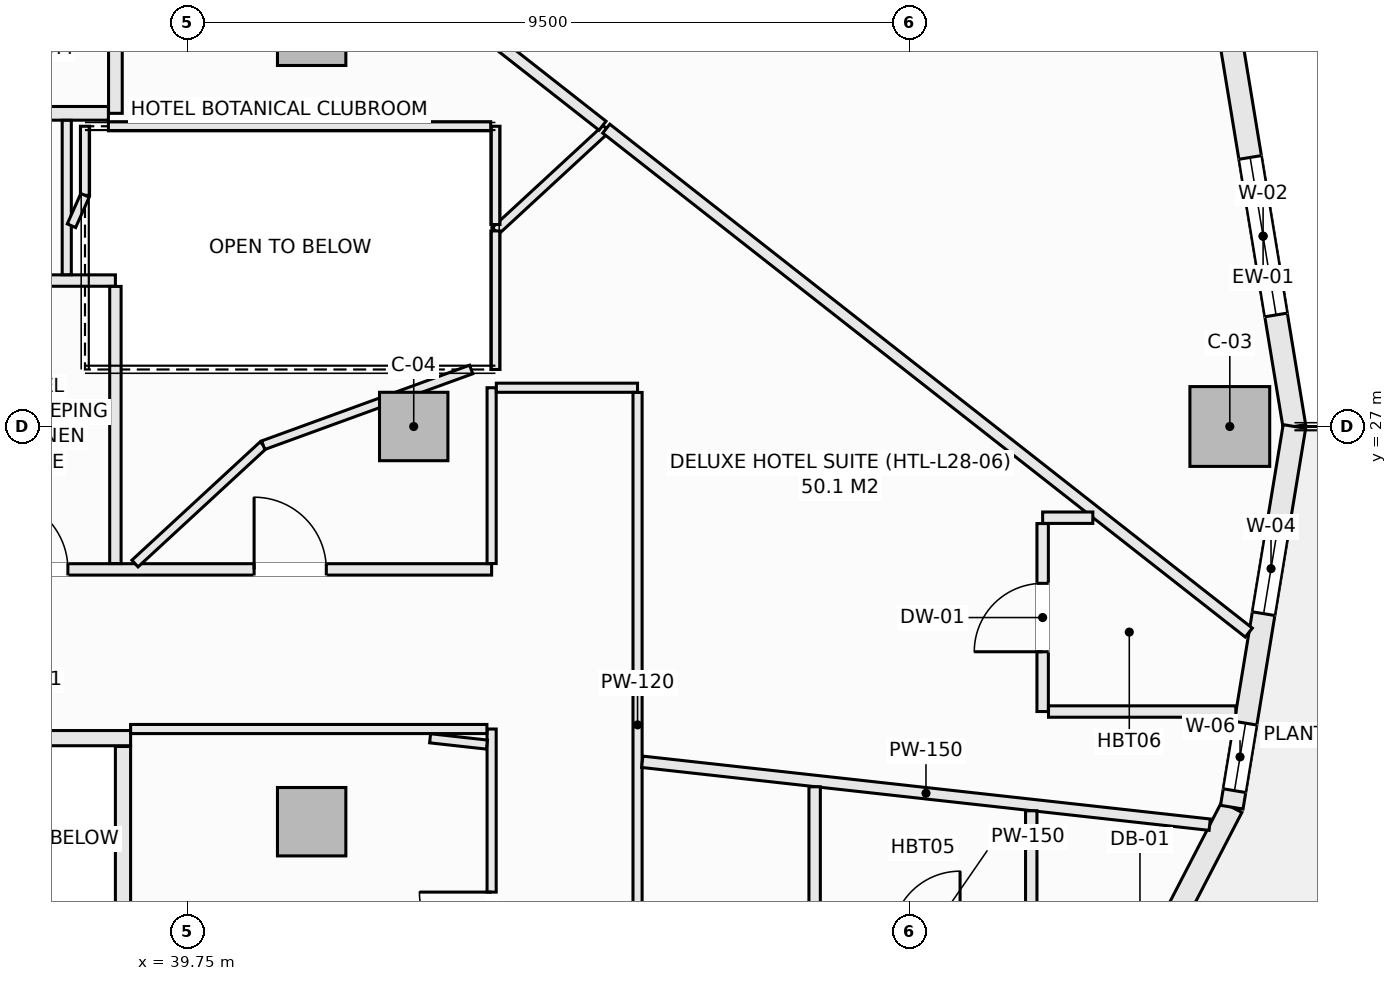
"""IFC4 building model, lengths in metres.
Left out: names, types, materials, properties, quantities, classifications, styles, units other than length and angle.
Written with IfcOpenShell. Run it as: python <this file> out.ifc"""

import sys

from ifc_helpers import new_model, si_unit, direction, frame, frame_2d, origin, origin_2d, place, context, subcontext, project, spatial, rectangle, extrude, element, fill, save


model = new_model("IFC4")
c1 = context("Model", 3, precision=1e-05, world=origin(), true_north=direction((0.0, 1.0)))
c2 = subcontext(c1, "Body", "Model", "MODEL_VIEW")
j1 = project(units=[si_unit("LENGTHUNIT", "METRE"), si_unit("PLANEANGLEUNIT", "RADIAN")], contexts=[c1])
p1 = place(None, origin())
s1 = spatial("IfcSite", under=j1, at=p1, CompositionType="ELEMENT")
p2 = place(p1, origin())
s2 = spatial("IfcBuilding", under=s1, at=p2, CompositionType="ELEMENT")
p3 = place(p2, frame((0.0, 0.0, 115.5)))
s3 = spatial("IfcBuildingStorey", under=s2, at=p3, CompositionType="ELEMENT", Elevation=115.5)
p4 = place(p3, frame((53.462, 27.0, -0.27), z_axis=(0.0, 0.0, 1.0), x_axis=(1.0, 0.0, 0.0)))
e1 = element("IfcColumn", 1, at=p4, inside=s3, PredefinedType="COLUMN", context=c2, shape_type="SweptSolid", body=[
    extrude(rectangle(XDim=1.05, YDim=1.05, at=origin_2d()), origin(), (0.0, 0.0, 1.0), 3.4),
])
for number, where, z_axis, x_axis in (
    (2, (42.725, 27.0, -0.27), (0.0, 0.0, 1.0), (1.0, 0.0, 0.0)),
    (3, (41.382, 32.199, -0.27), (0.0, 0.0, 1.0), (1.0, 0.0, 0.0)),
    (4, (41.382, 21.801, -0.27), (0.0, 0.0, 1.0), (1.0, 0.0, 0.0)),
):
    element("IfcColumn", number, at=place(p3, frame(where, z_axis=z_axis, x_axis=x_axis)), inside=s3, PredefinedType="COLUMN", context=c2, shape_type="SweptSolid", body=[
        extrude(rectangle(XDim=0.9, YDim=0.9, at=origin_2d()), origin(), (0.0, 0.0, 1.0), 3.4),
    ])
p5 = place(p3, frame((53.488, 32.008, 0.0), z_axis=(0.0, 0.0, 1.0), x_axis=(0.162393944769, -0.986726003864, 0.0)))
e5 = element("IfcWall", 5, at=p5, inside=s3, PredefinedType="SOLIDWALL", context=c2, shape_type="SweptSolid", body=[
    extrude(rectangle(XDim=5.075, YDim=0.3, at=frame_2d((2.538, 0.0))), origin(), (0.0, 0.0, 1.0), 2.653),
])
p6 = place(p5, frame((1.488, 0.0, 0.74)))
e6 = element("IfcOpeningElement", 6, at=p6, cuts=e5, PredefinedType="OPENING", context=c2, shape_type="SweptSolid", body=[
    extrude(rectangle(XDim=2.1, YDim=1.7, at=frame_2d((1.05, 0.85))), frame((0.0, 0.16, 0.0), z_axis=(0.0, -1.0, 0.0), x_axis=(1.0, 0.0, 0.0)), (0.0, 0.0, 1.0), 0.32),
])
p7 = place(p3, frame((51.072, 17.325, 0.0), z_axis=(0.0, 0.0, 1.0), x_axis=(0.459767899643, 0.888039119892, 0.0)))
e7 = element("IfcWall", 7, at=p7, inside=s3, PredefinedType="SOLIDWALL", context=c2, shape_type="SweptSolid", body=[
    extrude(rectangle(XDim=5.255, YDim=0.3, at=frame_2d((2.628, 0.0))), origin(), (0.0, 0.0, 1.0), 2.653),
])
p8 = place(p7, frame((1.728, 0.0, 0.0)))
e8 = element("IfcOpeningElement", 8, at=p8, cuts=e7, PredefinedType="OPENING", context=c2, shape_type="SweptSolid", body=[
    extrude(rectangle(XDim=1.8, YDim=2.25, at=frame_2d((0.9, 1.125))), frame((0.0, 0.16, 0.0), z_axis=(0.0, -1.0, 0.0), x_axis=(1.0, 0.0, 0.0)), (0.0, 0.0, 1.0), 0.32),
])
p9 = place(p3, frame((53.488, 21.992, 0.0), z_axis=(0.0, 0.0, 1.0), x_axis=(0.162393944769, 0.986726003864, 0.0)))
e9 = element("IfcWall", 9, at=p9, inside=s3, PredefinedType="SOLIDWALL", context=c2, shape_type="SweptSolid", body=[
    extrude(rectangle(XDim=5.075, YDim=0.3, at=frame_2d((2.538, 0.0))), origin(), (0.0, 0.0, 1.0), 2.653),
])
p10 = place(p9, frame((2.58, 0.0, 0.72)))
e10 = element("IfcOpeningElement", 10, at=p10, cuts=e9, PredefinedType="OPENING", context=c2, shape_type="SweptSolid", body=[
    extrude(rectangle(XDim=1.2, YDim=1.65, at=frame_2d((0.6, 0.825))), frame((0.0, 0.16, 0.0), z_axis=(0.0, -1.0, 0.0), x_axis=(1.0, 0.0, 0.0)), (0.0, 0.0, 1.0), 0.32),
])
p11 = place(p9, frame((0.22, 0.0, 0.72)))
e11 = element("IfcOpeningElement", 11, at=p11, cuts=e9, PredefinedType="OPENING", context=c2, shape_type="SweptSolid", body=[
    extrude(rectangle(XDim=0.9, YDim=1.65, at=frame_2d((0.45, 0.825))), frame((0.0, 0.16, 0.0), z_axis=(0.0, -1.0, 0.0), x_axis=(1.0, 0.0, 0.0)), (0.0, 0.0, 1.0), 0.32),
])
p12 = place(p3, frame((54.129, 15.878, 0.0), z_axis=(0.0, 0.0, 1.0), x_axis=(0.441269631716, 0.897374566235, 0.0)))
e12 = element("IfcWall", 12, at=p12, inside=s3, PredefinedType="PARAPET", context=c2, shape_type="SweptSolid", body=[
    extrude(rectangle(XDim=6.056, YDim=0.22, at=frame_2d((3.028, 0.0))), origin(), (0.0, 0.0, 1.0), 0.52),
])
p13 = place(p3, frame((36.75, 22.9, 0.0), z_axis=(0.0, 0.0, 1.0), x_axis=(1.0, 0.0, 0.0)))
e13 = element("IfcWall", 13, at=p13, inside=s3, PredefinedType="SOLIDWALL", context=c2, shape_type="SweptSolid", body=[
    extrude(rectangle(XDim=2.25, YDim=0.2, at=frame_2d((1.125, 0.0))), origin(), (0.0, 0.0, 1.0), 3.13),
])
p14 = place(p3, frame((38.9, 20.36, 0.0), z_axis=(0.0, 0.0, 1.0), x_axis=(0.0, 1.0, 0.0)))
e14 = element("IfcWall", 14, at=p14, inside=s3, PredefinedType="SOLIDWALL", context=c2, shape_type="SweptSolid", body=[
    extrude(rectangle(XDim=2.43, YDim=0.2, at=frame_2d((1.215, 0.0))), origin(), (0.0, 0.0, 1.0), 3.13),
])
p15 = place(p3, frame((29.78, 25.12, 0.0), z_axis=(0.0, 0.0, 1.0), x_axis=(1.0, 0.0, 0.0)))
e15 = element("IfcWall", 15, at=p15, inside=s3, PredefinedType="PARTITIONING", context=c2, shape_type="SweptSolid", body=[
    extrude(rectangle(XDim=13.97, YDim=0.15, at=frame_2d((6.985, 0.0))), origin(), (0.0, 0.0, 1.0), 3.13),
])
p16 = place(p15, frame((3.14, 0.0, 0.0)))
e16 = element("IfcOpeningElement", 16, at=p16, cuts=e15, PredefinedType="OPENING", context=c2, shape_type="SweptSolid", body=[
    extrude(rectangle(XDim=0.95, YDim=2.1, at=frame_2d((0.475, 1.05))), frame((0.0, 0.085, 0.0), z_axis=(0.0, -1.0, 0.0), x_axis=(1.0, 0.0, 0.0)), (0.0, 0.0, 1.0), 0.17),
])
p17 = place(p15, frame((7.445, 0.0, 0.0)))
e17 = element("IfcOpeningElement", 17, at=p17, cuts=e15, PredefinedType="OPENING", context=c2, shape_type="SweptSolid", body=[
    extrude(rectangle(XDim=0.95, YDim=2.1, at=frame_2d((0.475, 1.05))), frame((0.0, 0.085, 0.0), z_axis=(0.0, -1.0, 0.0), x_axis=(1.0, 0.0, 0.0)), (0.0, 0.0, 1.0), 0.17),
])
p18 = place(p15, frame((10.845, 0.0, 0.0)))
e18 = element("IfcOpeningElement", 18, at=p18, cuts=e15, PredefinedType="OPENING", context=c2, shape_type="SweptSolid", body=[
    extrude(rectangle(XDim=0.95, YDim=2.1, at=frame_2d((0.475, 1.05))), frame((0.0, 0.085, 0.0), z_axis=(0.0, -1.0, 0.0), x_axis=(1.0, 0.0, 0.0)), (0.0, 0.0, 1.0), 0.17),
])
p19 = place(p3, frame((30.077, 28.92, 0.0), z_axis=(0.0, 0.0, 1.0), x_axis=(1.0, 0.0, 0.0)))
e19 = element("IfcWall", 19, at=p19, inside=s3, PredefinedType="PARTITIONING", context=c2, shape_type="SweptSolid", body=[
    extrude(rectangle(XDim=8.723, YDim=0.15, at=frame_2d((4.362, 0.0))), origin(), (0.0, 0.0, 1.0), 3.13),
])
p20 = place(p3, frame((38.8, 25.197, 0.0), z_axis=(0.0, 0.0, 1.0), x_axis=(0.0, 1.0, 0.0)))
e20 = element("IfcWall", 20, at=p20, inside=s3, PredefinedType="PARTITIONING", context=c2, shape_type="SweptSolid", body=[
    extrude(rectangle(XDim=3.646, YDim=0.15, at=frame_2d((1.823, 0.0))), origin(), (0.0, 0.0, 1.0), 3.13),
])
p21 = place(p3, frame((38.8, 31.12, 0.0), z_axis=(0.0, 0.0, 1.0), x_axis=(0.0, 1.0, 0.0)))
e21 = element("IfcWall", 21, at=p21, inside=s3, PredefinedType="SOLIDWALL", context=c2, shape_type="SweptSolid", body=[
    extrude(rectangle(XDim=2.63, YDim=0.18, at=frame_2d((1.315, 0.0))), origin(), (0.0, 0.0, 1.0), 3.13),
])
p22 = place(p3, frame((30.077, 31.12, 0.0), z_axis=(0.0, 0.0, 1.0), x_axis=(1.0, 0.0, 0.0)))
e22 = element("IfcWall", 22, at=p22, inside=s3, PredefinedType="SOLIDWALL", context=c2, shape_type="SweptSolid", body=[
    extrude(rectangle(XDim=8.631, YDim=0.18, at=frame_2d((4.315, 0.0))), origin(), (0.0, 0.0, 1.0), 3.13),
])
p23 = place(p22, frame((2.592, 0.0, 0.0)))
e23 = element("IfcOpeningElement", 23, at=p23, cuts=e22, PredefinedType="OPENING", context=c2, shape_type="SweptSolid", body=[
    extrude(rectangle(XDim=0.95, YDim=2.1, at=frame_2d((0.475, 1.05))), frame((0.0, 0.1, 0.0), z_axis=(0.0, -1.0, 0.0), x_axis=(1.0, 0.0, 0.0)), (0.0, 0.0, 1.0), 0.2),
])
p24 = place(p3, frame((38.16, 28.997, 0.0), z_axis=(0.0, 0.0, 1.0), x_axis=(0.0, 1.0, 0.0)))
e24 = element("IfcWall", 24, at=p24, inside=s3, PredefinedType="PARTITIONING", context=c2, shape_type="SweptSolid", body=[
    extrude(rectangle(XDim=2.031, YDim=0.12, at=frame_2d((1.016, 0.0))), origin(), (0.0, 0.0, 1.0), 3.13),
])
p25 = place(p3, frame((43.75, 17.779, 0.0), z_axis=(0.0, 0.0, 1.0), x_axis=(0.0, 1.0, 0.0)))
e25 = element("IfcWall", 25, at=p25, inside=s3, PredefinedType="PARTITIONING", context=c2, shape_type="SweptSolid", body=[
    extrude(rectangle(XDim=5.241, YDim=0.12, at=frame_2d((2.621, 0.0))), origin(), (0.0, 0.0, 1.0), 3.13),
])
p26 = place(p25, frame((2.146, 0.0, 0.0)))
e26 = element("IfcOpeningElement", 26, at=p26, cuts=e25, PredefinedType="OPENING", context=c2, shape_type="SweptSolid", body=[
    extrude(rectangle(XDim=0.95, YDim=2.1, at=frame_2d((0.475, 1.05))), frame((0.0, 0.07, 0.0), z_axis=(0.0, -1.0, 0.0), x_axis=(1.0, 0.0, 0.0)), (0.0, 0.0, 1.0), 0.14),
])
p27 = place(p3, frame((43.75, 25.197, 0.0), z_axis=(0.0, 0.0, 1.0), x_axis=(0.0, 1.0, 0.0)))
e27 = element("IfcWall", 27, at=p27, inside=s3, PredefinedType="PARTITIONING", context=c2, shape_type="SweptSolid", body=[
    extrude(rectangle(XDim=2.313, YDim=0.12, at=frame_2d((1.156, 0.0))), origin(), (0.0, 0.0, 1.0), 3.13),
])
p28 = place(p3, frame((43.812, 27.51, 0.0), z_axis=(0.0, 0.0, 1.0), x_axis=(1.0, 0.0, 0.0)))
e28 = element("IfcWall", 28, at=p28, inside=s3, PredefinedType="PARTITIONING", context=c2, shape_type="SweptSolid", body=[
    extrude(rectangle(XDim=1.858, YDim=0.12, at=frame_2d((0.929, 0.0))), origin(), (0.0, 0.0, 1.0), 3.13),
])
p29 = place(p3, frame((45.67, 18.701, 0.0), z_axis=(0.0, 0.0, 1.0), x_axis=(0.0, 1.0, 0.0)))
e29 = element("IfcWall", 29, at=p29, inside=s3, PredefinedType="PARTITIONING", context=c2, shape_type="SweptSolid", body=[
    extrude(rectangle(XDim=8.747, YDim=0.12, at=frame_2d((4.374, 0.0))), origin(), (0.0, 0.0, 1.0), 3.13),
])
p30 = place(p3, frame((39.0, 23.02, 0.0), z_axis=(0.0, 0.0, 1.0), x_axis=(1.0, 0.0, 0.0)))
e30 = element("IfcWall", 30, at=p30, inside=s3, PredefinedType="PARTITIONING", context=c2, shape_type="SweptSolid", body=[
    extrude(rectangle(XDim=4.688, YDim=0.12, at=frame_2d((2.344, 0.0))), origin(), (0.0, 0.0, 1.0), 3.13),
])
p31 = place(p3, frame((42.941, 22.898, 0.0), z_axis=(0.0, 0.0, 1.0), x_axis=(0.993923268999, -0.110075134986, 0.0)))
e31 = element("IfcWall", 31, at=p31, inside=s3, PredefinedType="PARTITIONING", context=c2, shape_type="SweptSolid", body=[
    extrude(rectangle(XDim=0.752, YDim=0.12, at=frame_2d((0.376, 0.0))), origin(), (0.0, 0.0, 1.0), 3.13),
])
p32 = place(p3, frame((45.732, 22.589, 0.0), z_axis=(0.0, 0.0, 1.0), x_axis=(0.993915007742, -0.110149704422, 0.0)))
e32 = element("IfcWall", 32, at=p32, inside=s3, PredefinedType="PARTITIONING", context=c2, shape_type="SweptSolid", body=[
    extrude(rectangle(XDim=7.511, YDim=0.15, at=frame_2d((3.756, 0.0))), origin(), (0.0, 0.0, 1.0), 3.13),
])
p33 = place(p3, frame((48.0, 20.25, 0.0), z_axis=(0.0, 0.0, 1.0), x_axis=(0.0, 1.0, 0.0)))
e33 = element("IfcWall", 33, at=p33, inside=s3, PredefinedType="PARTITIONING", context=c2, shape_type="SweptSolid", body=[
    extrude(rectangle(XDim=2.01, YDim=0.15, at=frame_2d((1.005, 0.0))), origin(), (0.0, 0.0, 1.0), 3.13),
])
p34 = place(p3, frame((50.85, 20.327, 0.0), z_axis=(0.0, 0.0, 1.0), x_axis=(0.0, 1.0, 0.0)))
e34 = element("IfcWall", 34, at=p34, inside=s3, PredefinedType="PARTITIONING", context=c2, shape_type="SweptSolid", body=[
    extrude(rectangle(XDim=1.617, YDim=0.15, at=frame_2d((0.809, 0.0))), origin(), (0.0, 0.0, 1.0), 3.13),
])
p35 = place(p3, frame((39.058, 25.197, 0.0), z_axis=(0.0, 0.0, 1.0), x_axis=(0.73497871786, 0.67809017416, 0.0)))
e35 = element("IfcWall", 35, at=p35, inside=s3, PredefinedType="PARTITIONING", context=c2, shape_type="SweptSolid", body=[
    extrude(rectangle(XDim=2.296, YDim=0.12, at=frame_2d((1.148, 0.0))), origin(), (0.0, 0.0, 1.0), 3.13),
])
p36 = place(p3, frame((43.8, 29.573, 0.0), z_axis=(0.0, 0.0, 1.0), x_axis=(0.734897778704, 0.678177893222, 0.0)))
e36 = element("IfcWall", 36, at=p36, inside=s3, PredefinedType="PARTITIONING", context=c2, shape_type="SweptSolid", body=[
    extrude(rectangle(XDim=1.984, YDim=0.12, at=frame_2d((0.992, 0.0))), origin(), (0.0, 0.0, 1.0), 3.13),
])
p37 = place(p3, frame((40.745, 26.754, 0.0), z_axis=(0.0, 0.0, 1.0), x_axis=(0.939656245212, 0.342120067862, 0.0)))
e37 = element("IfcWall", 37, at=p37, inside=s3, PredefinedType="PARTITIONING", context=c2, shape_type="SweptSolid", body=[
    extrude(rectangle(XDim=2.912, YDim=0.12, at=frame_2d((1.456, 0.0))), origin(), (0.0, 0.0, 1.0), 3.13),
])
p38 = place(p3, frame((43.8, 27.75, 0.0), z_axis=(0.0, 0.0, 1.0), x_axis=(0.0, 1.0, 0.0)))
e38 = element("IfcWall", 38, at=p38, inside=s3, PredefinedType="PARTITIONING", context=c2, shape_type="SweptSolid", body=[
    extrude(rectangle(XDim=1.823, YDim=0.12, at=frame_2d((0.912, 0.0))), origin(), (0.0, 0.0, 1.0), 3.13),
])
p39 = place(p3, frame((43.8, 29.657, 0.0), z_axis=(0.0, 0.0, 1.0), x_axis=(0.0, 1.0, 0.0)))
e39 = element("IfcWall", 39, at=p39, inside=s3, PredefinedType="PARTITIONING", context=c2, shape_type="SweptSolid", body=[
    extrude(rectangle(XDim=1.293, YDim=0.12, at=frame_2d((0.646, 0.0))), origin(), (0.0, 0.0, 1.0), 3.13),
])
p40 = place(p3, frame((34.112, 39.661, 0.0), z_axis=(0.0, 0.0, 1.0), x_axis=(0.786863471843, -0.617127115495, 0.0)))
e40 = element("IfcWall", 40, at=p40, inside=s3, PredefinedType="PARTITIONING", context=c2, shape_type="SweptSolid", body=[
    extrude(rectangle(XDim=14.103, YDim=0.15, at=frame_2d((7.052, 0.0))), origin(), (0.0, 0.0, 1.0), 2.505),
])
p41 = place(p3, frame((45.258, 30.919, 0.0), z_axis=(0.0, 0.0, 1.0), x_axis=(0.786869212034, -0.617119796436, 0.0)))
e41 = element("IfcWall", 41, at=p41, inside=s3, PredefinedType="PARTITIONING", context=c2, shape_type="SweptSolid", body=[
    extrude(rectangle(XDim=10.744, YDim=0.15, at=frame_2d((5.372, 0.0))), origin(), (0.0, 0.0, 1.0), 2.505),
])
p42 = place(p3, frame((51.0, 25.8, 0.0), z_axis=(0.0, 0.0, 1.0), x_axis=(1.0, 0.0, 0.0)))
e42 = element("IfcWall", 42, at=p42, inside=s3, PredefinedType="PARTITIONING", context=c2, shape_type="SweptSolid", body=[
    extrude(rectangle(XDim=0.66, YDim=0.15, at=frame_2d((0.33, 0.0))), origin(), (0.0, 0.0, 1.0), 3.13),
])
p43 = place(p3, frame((51.0, 23.25, 0.0), z_axis=(0.0, 0.0, 1.0), x_axis=(0.0, 1.0, 0.0)))
e43 = element("IfcWall", 43, at=p43, inside=s3, PredefinedType="PARTITIONING", context=c2, shape_type="SweptSolid", body=[
    extrude(rectangle(XDim=2.473, YDim=0.15, at=frame_2d((1.236, 0.0))), origin(), (0.0, 0.0, 1.0), 3.13),
])
p44 = place(p43, frame((0.787, 0.0, 0.0)))
e44 = element("IfcOpeningElement", 44, at=p44, cuts=e43, PredefinedType="OPENING", context=c2, shape_type="SweptSolid", body=[
    extrude(rectangle(XDim=0.9, YDim=2.1, at=frame_2d((0.45, 1.05))), frame((0.0, 0.085, 0.0), z_axis=(0.0, -1.0, 0.0), x_axis=(1.0, 0.0, 0.0)), (0.0, 0.0, 1.0), 0.17),
])
p45 = place(p3, frame((51.077, 23.25, 0.0), z_axis=(0.0, 0.0, 1.0), x_axis=(1.0, 0.0, 0.0)))
e45 = element("IfcWall", 45, at=p45, inside=s3, PredefinedType="PARTITIONING", context=c2, shape_type="SweptSolid", body=[
    extrude(rectangle(XDim=2.464, YDim=0.15, at=frame_2d((1.232, 0.0))), origin(), (0.0, 0.0, 1.0), 3.13),
])
p46 = place(p3, frame((38.708, 30.95, 0.0), z_axis=(0.0, 0.0, 1.0), x_axis=(1.0, 0.0, 0.0)))
e46 = element("IfcWall", 46, at=p46, inside=s3, PredefinedType="PARTITIONING", context=c2, shape_type="SweptSolid", body=[
    extrude(rectangle(XDim=5.03, YDim=0.12, at=frame_2d((2.515, 0.0))), origin(), (0.0, 0.0, 1.0), 3.13),
])
p47 = place(p3, frame((38.4, 30.041, 0.0), z_axis=(0.0, 0.0, 1.0), x_axis=(0.0, 1.0, 0.0)))
e47 = element("IfcWall", 47, at=p47, inside=s3, PredefinedType="PARTITIONING", context=c2, shape_type="SweptSolid", body=[
    extrude(rectangle(XDim=0.909, YDim=0.12, at=frame_2d((0.455, 0.0))), origin(), (0.0, 0.0, 1.0), 3.13),
])
p48 = place(p3, frame((38.222, 29.641, 0.0), z_axis=(0.0, 0.0, 1.0), x_axis=(0.406604168362, 0.913604427677, 0.0)))
e48 = element("IfcWall", 48, at=p48, inside=s3, PredefinedType="PARTITIONING", context=c2, shape_type="SweptSolid", body=[
    extrude(rectangle(XDim=0.438, YDim=0.12, at=frame_2d((0.219, 0.0))), origin(), (0.0, 0.0, 1.0), 3.13),
])
p49 = place(p6, origin())
e49 = element("IfcWindow", 49, at=p49, inside=s3, PartitioningType="SINGLE_PANEL", PredefinedType="WINDOW", context=c2, shape_type="SweptSolid", body=[
    extrude(rectangle(XDim=2.1, YDim=1.7, at=frame_2d((1.05, 0.85))), frame((0.0, 0.03, 0.0), z_axis=(0.0, -1.0, 0.0), x_axis=(1.0, 0.0, 0.0)), (0.0, 0.0, 1.0), 0.06),
])
fill(e6, e49)
p50 = place(p10, origin())
e50 = element("IfcWindow", 50, at=p50, inside=s3, PartitioningType="SINGLE_PANEL", PredefinedType="WINDOW", context=c2, shape_type="SweptSolid", body=[
    extrude(rectangle(XDim=1.2, YDim=1.65, at=frame_2d((0.6, 0.825))), frame((0.0, 0.03, 0.0), z_axis=(0.0, -1.0, 0.0), x_axis=(1.0, 0.0, 0.0)), (0.0, 0.0, 1.0), 0.06),
])
fill(e10, e50)
p51 = place(p17, origin())
e51 = element("IfcDoor", 51, at=p51, inside=s3, OperationType="SINGLE_SWING_LEFT", PredefinedType="DOOR", context=c2, shape_type="SweptSolid", body=[
    extrude(rectangle(XDim=0.95, YDim=2.1, at=frame_2d((0.475, 1.05))), frame((0.0, 0.025, 0.0), z_axis=(0.0, -1.0, 0.0), x_axis=(1.0, 0.0, 0.0)), (0.0, 0.0, 1.0), 0.05),
])
fill(e17, e51)
p52 = place(p26, origin())
e52 = element("IfcDoor", 52, at=p52, inside=s3, OperationType="SINGLE_SWING_RIGHT", PredefinedType="DOOR", context=c2, shape_type="SweptSolid", body=[
    extrude(rectangle(XDim=0.95, YDim=2.1, at=frame_2d((0.475, 1.05))), frame((0.0, 0.025, 0.0), z_axis=(0.0, -1.0, 0.0), x_axis=(1.0, 0.0, 0.0)), (0.0, 0.0, 1.0), 0.05),
])
fill(e26, e52)
p53 = place(p18, origin())
e53 = element("IfcDoor", 53, at=p53, inside=s3, OperationType="SINGLE_SWING_LEFT", PredefinedType="DOOR", context=c2, shape_type="SweptSolid", body=[
    extrude(rectangle(XDim=0.95, YDim=2.1, at=frame_2d((0.475, 1.05))), frame((0.0, 0.025, 0.0), z_axis=(0.0, -1.0, 0.0), x_axis=(1.0, 0.0, 0.0)), (0.0, 0.0, 1.0), 0.05),
])
fill(e18, e53)
p54 = place(p44, origin())
e54 = element("IfcDoor", 54, at=p54, inside=s3, OperationType="SINGLE_SWING_LEFT", PredefinedType="DOOR", context=c2, shape_type="SweptSolid", body=[
    extrude(rectangle(XDim=0.9, YDim=2.1, at=frame_2d((0.45, 1.05))), frame((0.0, 0.025, 0.0), z_axis=(0.0, -1.0, 0.0), x_axis=(1.0, 0.0, 0.0)), (0.0, 0.0, 1.0), 0.05),
])
fill(e44, e54)
p55 = place(p11, origin())
e55 = element("IfcWindow", 55, at=p55, inside=s3, PartitioningType="SINGLE_PANEL", PredefinedType="WINDOW", context=c2, shape_type="SweptSolid", body=[
    extrude(rectangle(XDim=0.9, YDim=1.65, at=frame_2d((0.45, 0.825))), frame((0.0, 0.03, 0.0), z_axis=(0.0, -1.0, 0.0), x_axis=(1.0, 0.0, 0.0)), (0.0, 0.0, 1.0), 0.06),
])
fill(e11, e55)
save(model, sys.argv[1])
